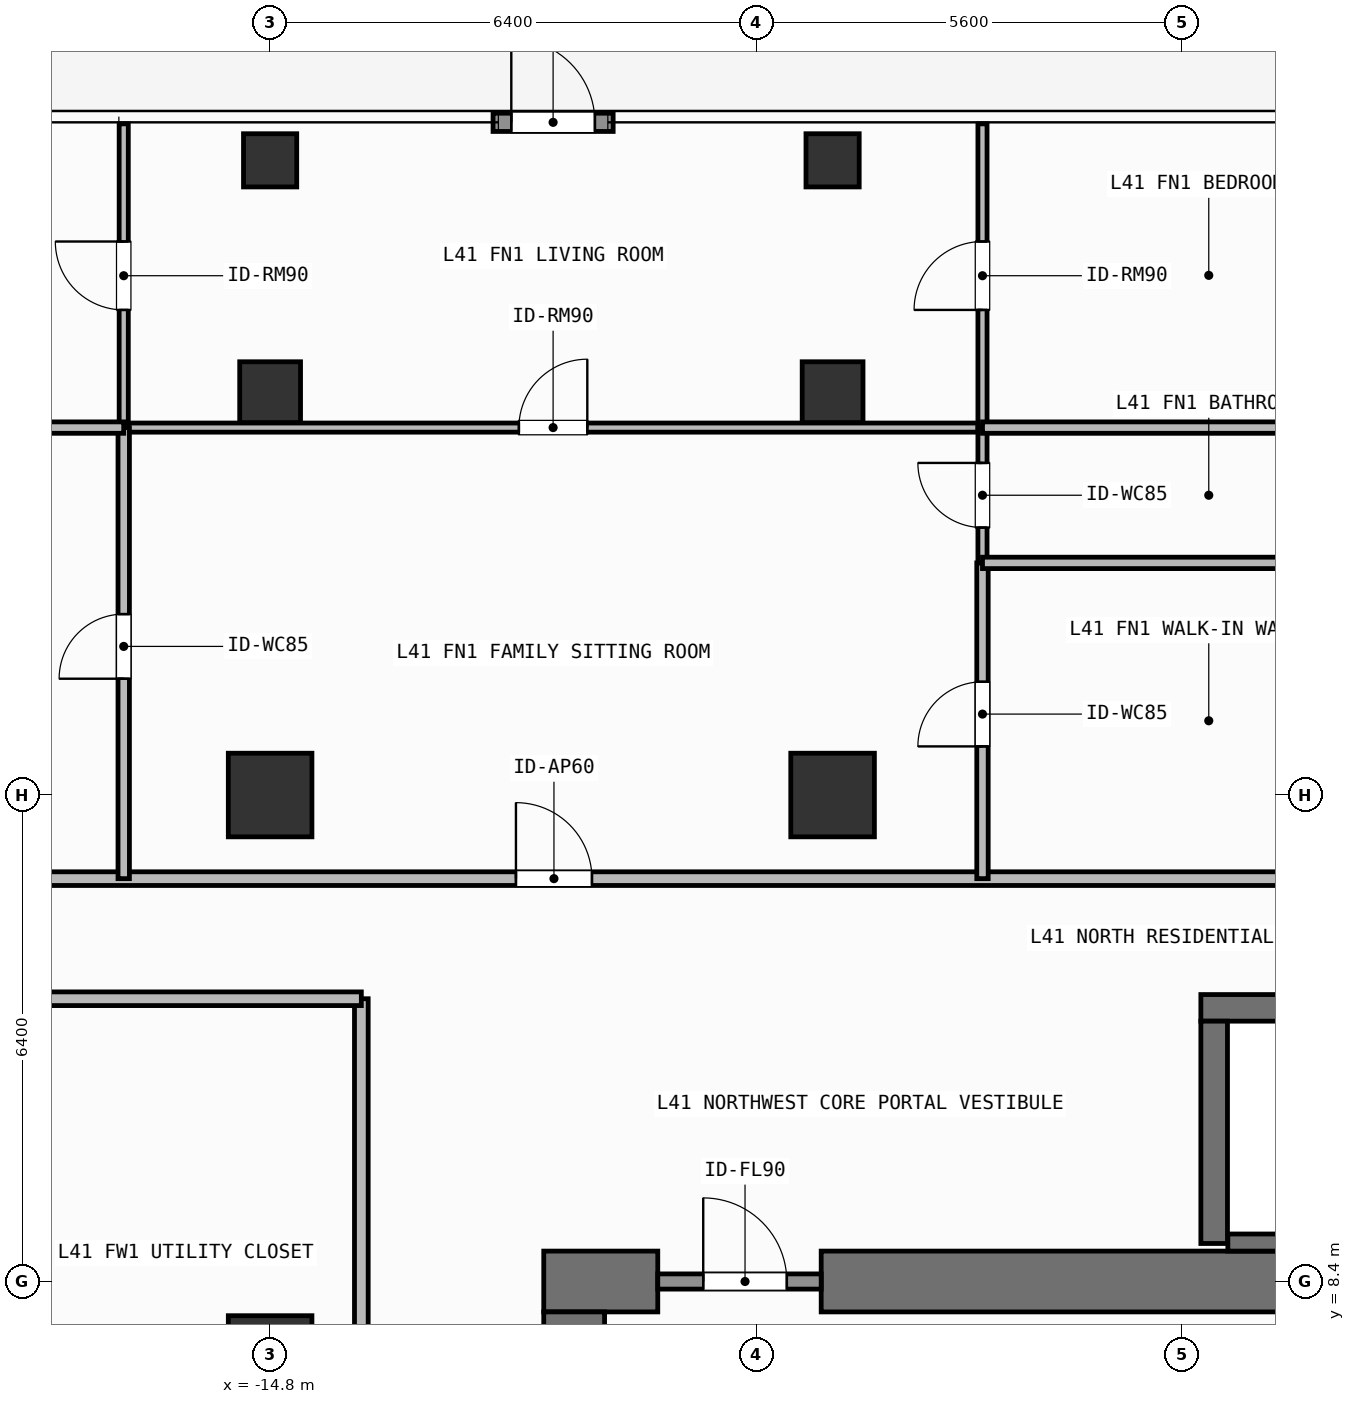
"""IFC4 building model, lengths in metres.
Left out: names, types, materials, properties, quantities, classifications, styles, units other than length and angle.
Written with IfcOpenShell. Run it as: python <this file> out.ifc"""

import sys

from ifc_helpers import new_model, si_unit, direction, frame, frame_2d, origin, origin_2d, place, context, subcontext, project, spatial, rectangle, hollow_rectangle, extrude, element, fill, save


model = new_model("IFC4")
c1 = context("Model", 3, precision=1e-05, world=origin(), true_north=direction((0.0, 1.0)))
c2 = subcontext(c1, "Body", "Model", "MODEL_VIEW")
j1 = project(units=[si_unit("LENGTHUNIT", "METRE"), si_unit("PLANEANGLEUNIT", "RADIAN")], contexts=[c1])
p1 = place(None, origin())
s1 = spatial("IfcSite", under=j1, at=p1, CompositionType="ELEMENT")
p2 = place(p1, origin())
s2 = spatial("IfcBuilding", under=s1, at=p2, CompositionType="ELEMENT")
p3 = place(p2, frame((0.0, 0.0, 168.0)))
s3 = spatial("IfcBuildingStorey", under=s2, at=p3, CompositionType="ELEMENT", Elevation=168.0)
p4 = place(p3, frame((-11.2, 8.4, 0.0), z_axis=(0.0, 0.0, 1.0), x_axis=(1.0, 0.0, 0.0)))
e1 = element("IfcWall", 1, at=p4, inside=s3, PredefinedType="SHEAR", context=c2, shape_type="SweptSolid", body=[
    extrude(rectangle(XDim=1.5, YDim=0.8, at=frame_2d((0.75, 0.0))), origin(), (0.0, 0.0, 1.0), 3.9),
])
p5 = place(p3, frame((-7.55, 8.4, 0.0), z_axis=(0.0, 0.0, 1.0), x_axis=(1.0, 0.0, 0.0)))
e2 = element("IfcWall", 2, at=p5, inside=s3, PredefinedType="SHEAR", context=c2, shape_type="SweptSolid", body=[
    extrude(rectangle(XDim=16.35, YDim=0.8, at=frame_2d((8.175, 0.0))), origin(), (0.0, 0.0, 1.0), 3.9),
])
p6 = place(p3, frame((-10.8, -8.0, 0.0), z_axis=(0.0, 0.0, 1.0), x_axis=(0.0, 1.0, 0.0)))
e3 = element("IfcWall", 3, at=p6, inside=s3, PredefinedType="SHEAR", context=c2, shape_type="SweptSolid", body=[
    extrude(rectangle(XDim=16.0, YDim=0.8, at=frame_2d((8.0, 0.0))), origin(), (0.0, 0.0, 1.0), 3.9),
])
p7 = place(p3, frame((-2.555, 12.0, 0.0), z_axis=(0.0, 0.0, 1.0), x_axis=(1.0, 0.0, 0.0)))
e4 = element("IfcWall", 4, at=p7, inside=s3, PredefinedType="SHEAR", context=c2, shape_type="SweptSolid", body=[
    extrude(rectangle(XDim=7.31, YDim=0.35, at=frame_2d((3.655, 0.0))), origin(), (0.0, 0.0, 1.0), 3.9),
])
p8 = place(p3, frame((-2.2, 8.913, 0.0), z_axis=(0.0, 0.0, 1.0), x_axis=(1.0, 0.0, 0.0)))
e5 = element("IfcWall", 5, at=p8, inside=s3, PredefinedType="SHEAR", context=c2, shape_type="SweptSolid", body=[
    extrude(rectangle(XDim=6.6, YDim=0.225, at=frame_2d((3.3, 0.0))), origin(), (0.0, 0.0, 1.0), 3.9),
])
p9 = place(p3, frame((-2.38, 8.9, 0.0), z_axis=(0.0, 0.0, 1.0), x_axis=(0.0, 1.0, 0.0)))
e6 = element("IfcWall", 6, at=p9, inside=s3, PredefinedType="SHEAR", context=c2, shape_type="SweptSolid", body=[
    extrude(rectangle(XDim=2.925, YDim=0.35, at=frame_2d((1.462, 0.0))), origin(), (0.0, 0.0, 1.0), 3.9),
])
for number, where, z_axis, x_axis in (
    (7, (-14.8, 14.8, 0.0), (0.0, 0.0, 1.0), (1.0, 0.0, 0.0)),
    (8, (-7.4, 14.8, 0.0), (0.0, 0.0, 1.0), (1.0, 0.0, 0.0)),
    (9, (-14.8, 7.4, 0.0), (0.0, 0.0, 1.0), (1.0, 0.0, 0.0)),
):
    element("IfcColumn", number, at=place(p3, frame(where, z_axis=z_axis, x_axis=x_axis)), inside=s3, PredefinedType="COLUMN", context=c2, shape_type="SweptSolid", body=[
        extrude(rectangle(XDim=1.1, YDim=1.1, at=origin_2d()), origin(), (0.0, 0.0, 1.0), 3.9),
    ])
for number, where, z_axis, x_axis in (
    (10, (-14.8, 20.1, 0.0), (0.0, 0.0, 1.0), (1.0, 0.0, 0.0)),
    (11, (-7.4, 20.1, 0.0), (0.0, 0.0, 1.0), (1.0, 0.0, 0.0)),
):
    element("IfcColumn", number, at=place(p3, frame(where, z_axis=z_axis, x_axis=x_axis)), inside=s3, PredefinedType="COLUMN", context=c2, shape_type="SweptSolid", body=[
        extrude(hollow_rectangle(XDim=0.8, YDim=0.8, WallThickness=0.036, at=origin_2d()), origin(), (0.0, 0.0, 1.0), 3.9),
    ])
for number, where, z_axis, x_axis in (
    (12, (-14.8, 23.15, 0.0), (0.0, 0.0, 1.0), (1.0, 0.0, 0.0)),
    (13, (-7.4, 23.15, 0.0), (0.0, 0.0, 1.0), (1.0, 0.0, 0.0)),
):
    element("IfcColumn", number, at=place(p3, frame(where, z_axis=z_axis, x_axis=x_axis)), inside=s3, PredefinedType="COLUMN", context=c2, shape_type="SweptSolid", body=[
        extrude(hollow_rectangle(XDim=0.7, YDim=0.7, WallThickness=0.032, at=origin_2d()), origin(), (0.0, 0.0, 1.0), 3.9),
    ])
p10 = place(p3, frame((-11.867, 23.65, 0.0), z_axis=(0.0, 0.0, 1.0), x_axis=(1.0, 0.0, 0.0)))
e14 = element("IfcWall", 14, at=p10, inside=s3, PredefinedType="SOLIDWALL", context=c2, shape_type="SweptSolid", body=[
    extrude(rectangle(XDim=1.58, YDim=0.24, at=frame_2d((0.79, 0.0))), origin(), (0.0, 0.0, 1.0), 3.68),
])
p11 = place(p10, frame((0.24, 0.0, 0.0)))
e15 = element("IfcOpeningElement", 15, at=p11, cuts=e14, PredefinedType="OPENING", context=c2, shape_type="SweptSolid", body=[
    extrude(rectangle(XDim=1.1, YDim=2.2, at=frame_2d((0.55, 1.1))), frame((0.0, 0.13, 0.0), z_axis=(0.0, -1.0, 0.0), x_axis=(1.0, 0.0, 0.0)), (0.0, 0.0, 1.0), 0.26),
])
p12 = place(p3, frame((-9.7, 8.4, 0.0), z_axis=(0.0, 0.0, 1.0), x_axis=(1.0, 0.0, 0.0)))
e16 = element("IfcWall", 16, at=p12, inside=s3, PredefinedType="SOLIDWALL", context=c2, shape_type="SweptSolid", body=[
    extrude(rectangle(XDim=2.15, YDim=0.2, at=frame_2d((1.075, 0.0))), origin(), (0.0, 0.0, 1.0), 2.82),
])
p13 = place(p12, frame((0.598, 0.0, 0.0)))
e17 = element("IfcOpeningElement", 17, at=p13, cuts=e16, PredefinedType="OPENING", context=c2, shape_type="SweptSolid", body=[
    extrude(rectangle(XDim=1.1, YDim=2.15, at=frame_2d((0.55, 1.075))), frame((0.0, 0.11, 0.0), z_axis=(0.0, -1.0, 0.0), x_axis=(1.0, 0.0, 0.0)), (0.0, 0.0, 1.0), 0.22),
])
p14 = place(p3, frame((-22.12, 13.7, 0.0), z_axis=(0.0, 0.0, 1.0), x_axis=(1.0, 0.0, 0.0)))
e18 = element("IfcWall", 18, at=p14, inside=s3, PredefinedType="PARTITIONING", context=c2, shape_type="SweptSolid", body=[
    extrude(rectangle(XDim=22.646, YDim=0.18, at=frame_2d((11.323, 0.0))), origin(), (0.0, 0.0, 1.0), 3.68),
])
p15 = place(p14, frame((10.554, 0.0, 0.0)))
e19 = element("IfcOpeningElement", 19, at=p15, cuts=e18, PredefinedType="OPENING", context=c2, shape_type="SweptSolid", body=[
    extrude(rectangle(XDim=1.0, YDim=2.2, at=frame_2d((0.5, 1.1))), frame((0.0, 0.1, 0.0), z_axis=(0.0, -1.0, 0.0), x_axis=(1.0, 0.0, 0.0)), (0.0, 0.0, 1.0), 0.2),
])
p16 = place(p3, frame((-16.726, 19.634, 0.0), z_axis=(0.0, 0.0, 1.0), x_axis=(1.0, 0.0, 0.0)))
e20 = element("IfcWall", 20, at=p16, inside=s3, PredefinedType="PARTITIONING", context=c2, shape_type="SweptSolid", body=[
    extrude(rectangle(XDim=11.298, YDim=0.12, at=frame_2d((5.649, 0.0))), origin(), (0.0, 0.0, 1.0), 3.68),
])
p17 = place(p16, frame((5.199, 0.0, 0.0)))
e21 = element("IfcOpeningElement", 21, at=p17, cuts=e20, PredefinedType="OPENING", context=c2, shape_type="SweptSolid", body=[
    extrude(rectangle(XDim=0.9, YDim=2.1, at=frame_2d((0.45, 1.05))), frame((0.0, 0.07, 0.0), z_axis=(0.0, -1.0, 0.0), x_axis=(1.0, 0.0, 0.0)), (0.0, 0.0, 1.0), 0.14),
])
p18 = place(p3, frame((-16.726, 13.7, 0.0), z_axis=(0.0, 0.0, 1.0), x_axis=(0.0, 1.0, 0.0)))
e22 = element("IfcWall", 22, at=p18, inside=s3, PredefinedType="PARTITIONING", context=c2, shape_type="SweptSolid", body=[
    extrude(rectangle(XDim=5.934, YDim=0.15, at=frame_2d((2.967, 0.0))), origin(), (0.0, 0.0, 1.0), 3.68),
])
p19 = place(p18, frame((2.63, 0.0, 0.0)))
e23 = element("IfcOpeningElement", 23, at=p19, cuts=e22, PredefinedType="OPENING", context=c2, shape_type="SweptSolid", body=[
    extrude(rectangle(XDim=0.85, YDim=2.1, at=frame_2d((0.425, 1.05))), frame((0.0, 0.085, 0.0), z_axis=(0.0, -1.0, 0.0), x_axis=(1.0, 0.0, 0.0)), (0.0, 0.0, 1.0), 0.17),
])
p20 = place(p3, frame((-16.726, 19.634, 0.0), z_axis=(0.0, 0.0, 1.0), x_axis=(0.0, 1.0, 0.0)))
e24 = element("IfcWall", 24, at=p20, inside=s3, PredefinedType="PARTITIONING", context=c2, shape_type="SweptSolid", body=[
    extrude(rectangle(XDim=3.996, YDim=0.12, at=frame_2d((1.998, 0.0))), origin(), (0.0, 0.0, 1.0), 3.68),
])
p21 = place(p20, frame((1.548, 0.0, 0.0)))
e25 = element("IfcOpeningElement", 25, at=p21, cuts=e24, PredefinedType="OPENING", context=c2, shape_type="SweptSolid", body=[
    extrude(rectangle(XDim=0.9, YDim=2.1, at=frame_2d((0.45, 1.05))), frame((0.0, 0.07, 0.0), z_axis=(0.0, -1.0, 0.0), x_axis=(1.0, 0.0, 0.0)), (0.0, 0.0, 1.0), 0.14),
])
p22 = place(p3, frame((-5.428, 13.7, 0.0), z_axis=(0.0, 0.0, 1.0), x_axis=(0.0, 1.0, 0.0)))
e26 = element("IfcWall", 26, at=p22, inside=s3, PredefinedType="PARTITIONING", context=c2, shape_type="SweptSolid", body=[
    extrude(rectangle(XDim=4.154, YDim=0.15, at=frame_2d((2.077, 0.0))), origin(), (0.0, 0.0, 1.0), 3.68),
])
p23 = place(p22, frame((1.74, 0.0, 0.0)))
e27 = element("IfcOpeningElement", 27, at=p23, cuts=e26, PredefinedType="OPENING", context=c2, shape_type="SweptSolid", body=[
    extrude(rectangle(XDim=0.85, YDim=2.1, at=frame_2d((0.425, 1.05))), frame((0.0, 0.085, 0.0), z_axis=(0.0, -1.0, 0.0), x_axis=(1.0, 0.0, 0.0)), (0.0, 0.0, 1.0), 0.17),
])
p24 = place(p3, frame((-5.428, 17.854, 0.0), z_axis=(0.0, 0.0, 1.0), x_axis=(0.0, 1.0, 0.0)))
e28 = element("IfcWall", 28, at=p24, inside=s3, PredefinedType="PARTITIONING", context=c2, shape_type="SweptSolid", body=[
    extrude(rectangle(XDim=1.78, YDim=0.12, at=frame_2d((0.89, 0.0))), origin(), (0.0, 0.0, 1.0), 3.68),
])
p25 = place(p24, frame((0.465, 0.0, 0.0)))
e29 = element("IfcOpeningElement", 29, at=p25, cuts=e28, PredefinedType="OPENING", context=c2, shape_type="SweptSolid", body=[
    extrude(rectangle(XDim=0.85, YDim=2.1, at=frame_2d((0.425, 1.05))), frame((0.0, 0.07, 0.0), z_axis=(0.0, -1.0, 0.0), x_axis=(1.0, 0.0, 0.0)), (0.0, 0.0, 1.0), 0.14),
])
p26 = place(p3, frame((-5.428, 19.634, 0.0), z_axis=(0.0, 0.0, 1.0), x_axis=(0.0, 1.0, 0.0)))
e30 = element("IfcWall", 30, at=p26, inside=s3, PredefinedType="PARTITIONING", context=c2, shape_type="SweptSolid", body=[
    extrude(rectangle(XDim=3.996, YDim=0.12, at=frame_2d((1.998, 0.0))), origin(), (0.0, 0.0, 1.0), 3.68),
])
p27 = place(p26, frame((1.548, 0.0, 0.0)))
e31 = element("IfcOpeningElement", 31, at=p27, cuts=e30, PredefinedType="OPENING", context=c2, shape_type="SweptSolid", body=[
    extrude(rectangle(XDim=0.9, YDim=2.1, at=frame_2d((0.45, 1.05))), frame((0.0, 0.07, 0.0), z_axis=(0.0, -1.0, 0.0), x_axis=(1.0, 0.0, 0.0)), (0.0, 0.0, 1.0), 0.14),
])
p28 = place(p3, frame((-13.6, -12.12, 0.0), z_axis=(0.0, 0.0, 1.0), x_axis=(0.0, 1.0, 0.0)))
e32 = element("IfcWall", 32, at=p28, inside=s3, PredefinedType="PARTITIONING", context=c2, shape_type="SweptSolid", body=[
    extrude(rectangle(XDim=24.24, YDim=0.18, at=frame_2d((12.12, 0.0))), origin(), (0.0, 0.0, 1.0), 3.68),
])
p29 = place(p28, frame((11.62, 0.0, 0.0)))
e33 = element("IfcOpeningElement", 33, at=p29, cuts=e32, PredefinedType="OPENING", context=c2, shape_type="SweptSolid", body=[
    extrude(rectangle(XDim=1.0, YDim=2.2, at=frame_2d((0.5, 1.1))), frame((0.0, 0.1, 0.0), z_axis=(0.0, -1.0, 0.0), x_axis=(1.0, 0.0, 0.0)), (0.0, 0.0, 1.0), 0.2),
])
p30 = place(p3, frame((-22.12, 19.634, 0.0), z_axis=(0.0, 0.0, 1.0), x_axis=(1.0, 0.0, 0.0)))
e34 = element("IfcWall", 34, at=p30, inside=s3, PredefinedType="PARTITIONING", context=c2, shape_type="SweptSolid", body=[
    extrude(rectangle(XDim=5.394, YDim=0.15, at=frame_2d((2.697, 0.0))), origin(), (0.0, 0.0, 1.0), 3.68),
])
for number, where, z_axis, x_axis in (
    (35, (-5.428, 17.854, 0.0), (0.0, 0.0, 1.0), (1.0, 0.0, 0.0)),
    (36, (-5.428, 19.634, 0.0), (0.0, 0.0, 1.0), (1.0, 0.0, 0.0)),
):
    element("IfcWall", number, at=place(p3, frame(where, z_axis=z_axis, x_axis=x_axis)), inside=s3, PredefinedType="PARTITIONING", context=c2, shape_type="SweptSolid", body=[
        extrude(rectangle(XDim=5.954, YDim=0.15, at=frame_2d((2.977, 0.0))), origin(), (0.0, 0.0, 1.0), 3.68),
    ])
p31 = place(p3, frame((-25.53, 12.12, 0.0), z_axis=(0.0, 0.0, 1.0), x_axis=(1.0, 0.0, 0.0)))
e37 = element("IfcWall", 37, at=p31, inside=s3, PredefinedType="PARTITIONING", context=c2, shape_type="SweptSolid", body=[
    extrude(rectangle(XDim=11.93, YDim=0.18, at=frame_2d((5.965, 0.0))), origin(), (0.0, 0.0, 1.0), 3.68),
])
p32 = place(p11, origin())
e38 = element("IfcDoor", 38, at=p32, inside=s3, OperationType="SINGLE_SWING_LEFT", PredefinedType="DOOR", context=c2, shape_type="SweptSolid", body=[
    extrude(rectangle(XDim=1.1, YDim=2.2, at=frame_2d((0.55, 1.1))), frame((0.0, 0.025, 0.0), z_axis=(0.0, -1.0, 0.0), x_axis=(1.0, 0.0, 0.0)), (0.0, 0.0, 1.0), 0.05),
])
fill(e15, e38)
p33 = place(p13, origin())
e39 = element("IfcDoor", 39, at=p33, inside=s3, OperationType="SINGLE_SWING_LEFT", PredefinedType="DOOR", context=c2, shape_type="SweptSolid", body=[
    extrude(rectangle(XDim=1.1, YDim=2.15, at=frame_2d((0.55, 1.075))), frame((0.0, 0.025, 0.0), z_axis=(0.0, -1.0, 0.0), x_axis=(1.0, 0.0, 0.0)), (0.0, 0.0, 1.0), 0.05),
])
fill(e17, e39)
p34 = place(p15, origin())
e40 = element("IfcDoor", 40, at=p34, inside=s3, OperationType="SINGLE_SWING_LEFT", PredefinedType="DOOR", context=c2, shape_type="SweptSolid", body=[
    extrude(rectangle(XDim=1.0, YDim=2.2, at=frame_2d((0.5, 1.1))), frame((0.0, 0.025, 0.0), z_axis=(0.0, -1.0, 0.0), x_axis=(1.0, 0.0, 0.0)), (0.0, 0.0, 1.0), 0.05),
])
fill(e19, e40)
p35 = place(p17, origin())
e41 = element("IfcDoor", 41, at=p35, inside=s3, OperationType="SINGLE_SWING_RIGHT", PredefinedType="DOOR", context=c2, shape_type="SweptSolid", body=[
    extrude(rectangle(XDim=0.9, YDim=2.1, at=frame_2d((0.45, 1.05))), frame((0.0, 0.025, 0.0), z_axis=(0.0, -1.0, 0.0), x_axis=(1.0, 0.0, 0.0)), (0.0, 0.0, 1.0), 0.05),
])
fill(e21, e41)
p36 = place(p19, origin())
e42 = element("IfcDoor", 42, at=p36, inside=s3, OperationType="SINGLE_SWING_LEFT", PredefinedType="DOOR", context=c2, shape_type="SweptSolid", body=[
    extrude(rectangle(XDim=0.85, YDim=2.1, at=frame_2d((0.425, 1.05))), frame((0.0, 0.025, 0.0), z_axis=(0.0, -1.0, 0.0), x_axis=(1.0, 0.0, 0.0)), (0.0, 0.0, 1.0), 0.05),
])
fill(e23, e42)
p37 = place(p21, origin())
e43 = element("IfcDoor", 43, at=p37, inside=s3, OperationType="SINGLE_SWING_RIGHT", PredefinedType="DOOR", context=c2, shape_type="SweptSolid", body=[
    extrude(rectangle(XDim=0.9, YDim=2.1, at=frame_2d((0.45, 1.05))), frame((0.0, 0.025, 0.0), z_axis=(0.0, -1.0, 0.0), x_axis=(1.0, 0.0, 0.0)), (0.0, 0.0, 1.0), 0.05),
])
fill(e25, e43)
p38 = place(p23, origin())
e44 = element("IfcDoor", 44, at=p38, inside=s3, OperationType="SINGLE_SWING_LEFT", PredefinedType="DOOR", context=c2, shape_type="SweptSolid", body=[
    extrude(rectangle(XDim=0.85, YDim=2.1, at=frame_2d((0.425, 1.05))), frame((0.0, 0.025, 0.0), z_axis=(0.0, -1.0, 0.0), x_axis=(1.0, 0.0, 0.0)), (0.0, 0.0, 1.0), 0.05),
])
fill(e27, e44)
p39 = place(p25, origin())
e45 = element("IfcDoor", 45, at=p39, inside=s3, OperationType="SINGLE_SWING_RIGHT", PredefinedType="DOOR", context=c2, shape_type="SweptSolid", body=[
    extrude(rectangle(XDim=0.85, YDim=2.1, at=frame_2d((0.425, 1.05))), frame((0.0, 0.025, 0.0), z_axis=(0.0, -1.0, 0.0), x_axis=(1.0, 0.0, 0.0)), (0.0, 0.0, 1.0), 0.05),
])
fill(e29, e45)
p40 = place(p27, origin())
e46 = element("IfcDoor", 46, at=p40, inside=s3, OperationType="SINGLE_SWING_LEFT", PredefinedType="DOOR", context=c2, shape_type="SweptSolid", body=[
    extrude(rectangle(XDim=0.9, YDim=2.1, at=frame_2d((0.45, 1.05))), frame((0.0, 0.025, 0.0), z_axis=(0.0, -1.0, 0.0), x_axis=(1.0, 0.0, 0.0)), (0.0, 0.0, 1.0), 0.05),
])
fill(e31, e46)
save(model, sys.argv[1])
